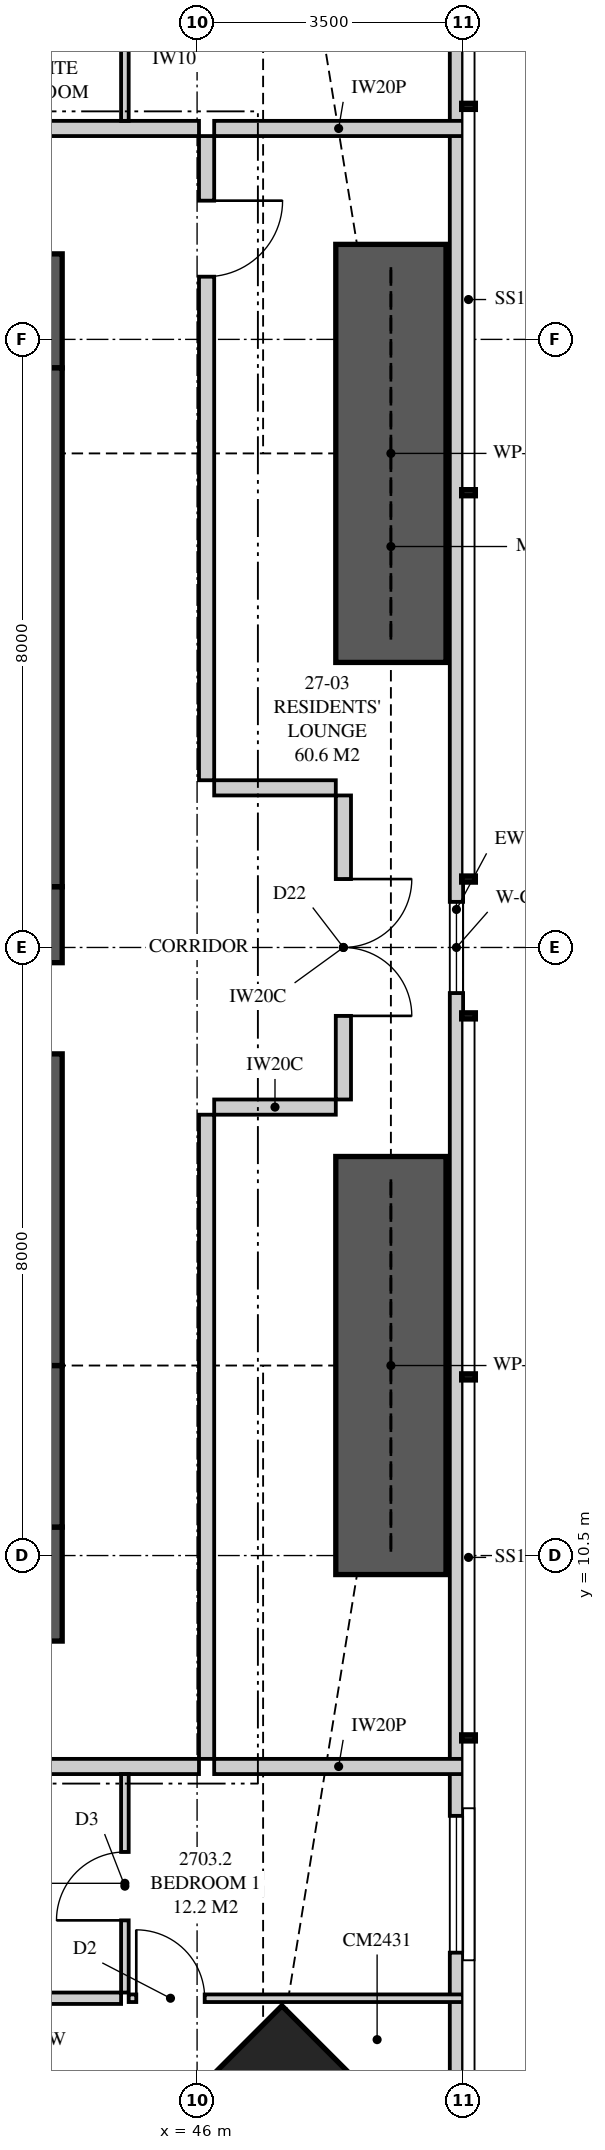
"""IFC4 building model, lengths in metres.
Left out: names, types, materials, properties, quantities, classifications, styles, units other than length and angle.
Written with IfcOpenShell. Run it as: python <this file> out.ifc"""

import sys

from ifc_helpers import new_model, si_unit, direction, frame, frame_2d, origin, origin_2d, place, context, subcontext, project, spatial, polyline, rectangle, outline, extrude, element, fill, save


model = new_model("IFC4")
c1 = context("Model", 3, precision=1e-05, world=origin(), true_north=direction((0.0, 1.0)))
c2 = subcontext(c1, "Body", "Model", "MODEL_VIEW")
j1 = project(units=[si_unit("LENGTHUNIT", "METRE"), si_unit("PLANEANGLEUNIT", "RADIAN")], contexts=[c1])
p1 = place(None, origin())
s1 = spatial("IfcSite", under=j1, at=p1, CompositionType="ELEMENT")
p2 = place(p1, origin())
s2 = spatial("IfcBuilding", under=s1, at=p2, CompositionType="ELEMENT")
p3 = place(p2, frame((0.0, 0.0, 101.5)))
s3 = spatial("IfcBuildingStorey", under=s2, at=p3, CompositionType="ELEMENT", Elevation=101.5)
p4 = place(p3, frame((46.869, 2.631, 0.0), z_axis=(0.0, 0.0, 1.0), x_axis=(-0.707106781187, 0.707106781187, 0.0)))
e1 = element("IfcColumn", 1, at=p4, inside=s3, PredefinedType="COLUMN", context=c2, shape_type="SweptSolid", body=[
    extrude(rectangle(XDim=2.4, YDim=3.1, at=origin_2d()), origin(), (0.0, 0.0, 1.0), 3.35),
])
p5 = place(p3, frame((35.9, 10.125, 0.0), z_axis=(0.0, 0.0, 1.0), x_axis=(1.0, 0.0, 0.0)))
e2 = element("IfcWall", 2, at=p5, inside=s3, PredefinedType="SHEAR", context=c2, shape_type="SweptSolid", body=[
    extrude(rectangle(XDim=8.325, YDim=1.5, at=frame_2d((4.163, 0.0))), origin(), (0.0, 0.0, 1.0), 3.35),
])
p6 = place(p5, frame((2.7, 0.0, 0.0)))
e3 = element("IfcOpeningElement", 3, at=p6, cuts=e2, PredefinedType="OPENING", context=c2, shape_type="SweptSolid", body=[
    extrude(rectangle(XDim=1.0, YDim=2.1, at=frame_2d((0.5, 1.05))), frame((0.0, 0.76, 0.0), z_axis=(0.0, -1.0, 0.0), x_axis=(1.0, 0.0, 0.0)), (0.0, 0.0, 1.0), 1.52),
])
p7 = place(p3, frame((44.225, 26.875, 0.0), z_axis=(0.0, 0.0, 1.0), x_axis=(-1.0, 0.0, 0.0)))
e4 = element("IfcWall", 4, at=p7, inside=s3, PredefinedType="SHEAR", context=c2, shape_type="SweptSolid", body=[
    extrude(rectangle(XDim=8.325, YDim=1.5, at=frame_2d((4.163, 0.0))), origin(), (0.0, 0.0, 1.0), 3.35),
])
p8 = place(p7, frame((5.725, 0.0, 0.0)))
e5 = element("IfcOpeningElement", 5, at=p8, cuts=e4, PredefinedType="OPENING", context=c2, shape_type="SweptSolid", body=[
    extrude(rectangle(XDim=0.9, YDim=2.1, at=frame_2d((0.45, 1.05))), frame((0.0, 0.76, 0.0), z_axis=(0.0, -1.0, 0.0), x_axis=(1.0, 0.0, 0.0)), (0.0, 0.0, 1.0), 1.52),
])
p9 = place(p3, frame((43.8, 10.875, 0.0), z_axis=(0.0, 0.0, 1.0), x_axis=(0.0, 1.0, 0.0)))
e6 = element("IfcWall", 6, at=p9, inside=s3, PredefinedType="SHEAR", context=c2, shape_type="SweptSolid", body=[
    extrude(rectangle(XDim=2.125, YDim=0.85, at=frame_2d((1.062, 0.0))), origin(), (0.0, 0.0, 1.0), 3.35),
])
p10 = place(p3, frame((43.8, 13.0, 0.0), z_axis=(0.0, 0.0, 1.0), x_axis=(0.0, 1.0, 0.0)))
e7 = element("IfcWall", 7, at=p10, inside=s3, PredefinedType="SHEAR", context=c2, shape_type="SweptSolid", body=[
    extrude(rectangle(XDim=6.3, YDim=0.85, at=frame_2d((3.15, 0.0))), origin(), (0.0, 0.0, 1.0), 3.35),
])
p11 = place(p10, frame((4.1, 0.0, 0.0)))
e8 = element("IfcOpeningElement", 8, at=p11, cuts=e7, PredefinedType="OPENING", context=c2, shape_type="SweptSolid", body=[
    extrude(rectangle(XDim=1.2, YDim=2.2, at=frame_2d((0.6, 1.1))), frame((0.0, 0.435, 0.0), z_axis=(0.0, -1.0, 0.0), x_axis=(1.0, 0.0, 0.0)), (0.0, 0.0, 1.0), 0.87),
])
p12 = place(p3, frame((43.8, 19.3, 0.0), z_axis=(0.0, 0.0, 1.0), x_axis=(0.0, 1.0, 0.0)))
e9 = element("IfcWall", 9, at=p12, inside=s3, PredefinedType="SHEAR", context=c2, shape_type="SweptSolid", body=[
    extrude(rectangle(XDim=6.825, YDim=0.85, at=frame_2d((3.413, 0.0))), origin(), (0.0, 0.0, 1.0), 3.35),
])
p13 = place(p3, frame((49.413, 3.051, 0.0), z_axis=(0.0, 0.0, 1.0), x_axis=(0.0, 1.0, 0.0)))
e10 = element("IfcWall", 10, at=p13, inside=s3, PredefinedType="SOLIDWALL", context=c2, shape_type="SweptSolid", body=[
    extrude(outline(polyline([(0.0, 0.0), (31.897, 0.0), (31.897, 3.11), (22.167, 3.11), (22.167, 2.15), (22.074, 2.15), (22.074, 3.11), (21.949, 3.11), (21.949, 2.15), (9.949, 2.15), (9.949, 3.11), (9.823, 3.11), (9.823, 2.15), (9.73, 2.15), (9.73, 3.11), (0.0, 3.11), (0.0, 0.0)])), frame((0.0, 0.087, 0.0), z_axis=(0.0, -1.0, 0.0), x_axis=(1.0, 0.0, 0.0)), (0.0, 0.0, 1.0), 0.175),
])
p14 = place(p13, frame((2.224, 0.0, 0.4)))
e11 = element("IfcOpeningElement", 11, at=p14, cuts=e10, PredefinedType="OPENING", context=c2, shape_type="SweptSolid", body=[
    extrude(rectangle(XDim=1.8, YDim=1.7, at=frame_2d((0.9, 0.85))), frame((0.0, 0.097, 0.0), z_axis=(0.0, -1.0, 0.0), x_axis=(1.0, 0.0, 0.0)), (0.0, 0.0, 1.0), 0.195),
])
p15 = place(p13, frame((14.849, 0.0, 0.4)))
e12 = element("IfcOpeningElement", 12, at=p15, cuts=e10, PredefinedType="OPENING", context=c2, shape_type="SweptSolid", body=[
    extrude(rectangle(XDim=1.2, YDim=1.7, at=frame_2d((0.6, 0.85))), frame((0.0, 0.097, 0.0), z_axis=(0.0, -1.0, 0.0), x_axis=(1.0, 0.0, 0.0)), (0.0, 0.0, 1.0), 0.195),
])
p16 = place(p13, frame((27.373, 0.0, 0.4)))
e13 = element("IfcOpeningElement", 13, at=p16, cuts=e10, PredefinedType="OPENING", context=c2, shape_type="SweptSolid", body=[
    extrude(rectangle(XDim=1.8, YDim=1.7, at=frame_2d((0.9, 0.85))), frame((0.0, 0.097, 0.0), z_axis=(0.0, -1.0, 0.0), x_axis=(1.0, 0.0, 0.0)), (0.0, 0.0, 1.0), 0.195),
])
p17 = place(p3, frame((36.55, 7.725, 0.0), z_axis=(0.0, 0.0, 1.0), x_axis=(1.0, 0.0, 0.0)))
e14 = element("IfcWall", 14, at=p17, inside=s3, PredefinedType="PARTITIONING", context=c2, shape_type="SweptSolid", body=[
    extrude(outline(polyline([(0.0, 0.0), (9.475, 0.0), (9.475, 3.11), (2.412, 3.11), (2.412, 2.541), (1.738, 2.541), (1.738, 3.11), (0.0, 3.11), (0.0, 0.0)])), frame((0.0, 0.1, 0.0), z_axis=(0.0, -1.0, 0.0), x_axis=(1.0, 0.0, 0.0)), (0.0, 0.0, 1.0), 0.2),
])
p18 = place(p17, frame((2.4, 0.0, 0.0)))
e15 = element("IfcOpeningElement", 15, at=p18, cuts=e14, PredefinedType="OPENING", context=c2, shape_type="SweptSolid", body=[
    extrude(rectangle(XDim=1.05, YDim=2.2, at=frame_2d((0.525, 1.1))), frame((0.0, 0.11, 0.0), z_axis=(0.0, -1.0, 0.0), x_axis=(1.0, 0.0, 0.0)), (0.0, 0.0, 1.0), 0.22),
])
p19 = place(p3, frame((45.05, 4.751, 0.0), z_axis=(0.0, 0.0, 1.0), x_axis=(0.0, 1.0, 0.0)))
e16 = element("IfcWall", 16, at=p19, inside=s3, PredefinedType="PARTITIONING", context=c2, shape_type="SweptSolid", body=[
    extrude(rectangle(XDim=2.874, YDim=0.1, at=frame_2d((1.437, 0.0))), origin(), (0.0, 0.0, 1.0), 3.11),
])
p20 = place(p19, frame((0.949, 0.0, 0.0)))
e17 = element("IfcOpeningElement", 17, at=p20, cuts=e16, PredefinedType="OPENING", context=c2, shape_type="SweptSolid", body=[
    extrude(rectangle(XDim=0.9, YDim=2.1, at=frame_2d((0.45, 1.05))), frame((0.0, 0.06, 0.0), z_axis=(0.0, -1.0, 0.0), x_axis=(1.0, 0.0, 0.0)), (0.0, 0.0, 1.0), 0.12),
])
p21 = place(p3, frame((45.1, 4.676, 0.0), z_axis=(0.0, 0.0, 1.0), x_axis=(1.0, 0.0, 0.0)))
e18 = element("IfcWall", 18, at=p21, inside=s3, PredefinedType="PARTITIONING", context=c2, shape_type="SweptSolid", body=[
    extrude(outline(polyline([(0.0, 0.0), (4.4, 0.0), (4.4, 3.11), (2.971, 3.11), (2.971, 2.15), (1.229, 2.15), (1.229, 3.11), (0.0, 3.11), (0.0, 0.0)])), frame((0.0, 0.05, 0.0), z_axis=(0.0, -1.0, 0.0), x_axis=(1.0, 0.0, 0.0)), (0.0, 0.0, 1.0), 0.1),
])
p22 = place(p21, frame((0.1, 0.0, 0.0)))
e19 = element("IfcOpeningElement", 19, at=p22, cuts=e18, PredefinedType="OPENING", context=c2, shape_type="SweptSolid", body=[
    extrude(rectangle(XDim=0.9, YDim=2.1, at=frame_2d((0.45, 1.05))), frame((0.0, 0.06, 0.0), z_axis=(0.0, -1.0, 0.0), x_axis=(1.0, 0.0, 0.0)), (0.0, 0.0, 1.0), 0.12),
])
p23 = place(p3, frame((42.725, 4.676, 0.0), z_axis=(0.0, 0.0, 1.0), x_axis=(1.0, 0.0, 0.0)))
e20 = element("IfcWall", 20, at=p23, inside=s3, PredefinedType="PLUMBINGWALL", context=c2, shape_type="SweptSolid", body=[
    extrude(rectangle(XDim=2.275, YDim=0.15, at=frame_2d((1.137, 0.0))), origin(), (0.0, 0.0, 1.0), 3.11),
])
p24 = place(p3, frame((46.225, 7.725, 0.0), z_axis=(0.0, 0.0, 1.0), x_axis=(1.0, 0.0, 0.0)))
e21 = element("IfcWall", 21, at=p24, inside=s3, PredefinedType="PARTITIONING", context=c2, shape_type="SweptSolid", body=[
    extrude(outline(polyline([(0.0, 0.0), (3.275, 0.0), (3.275, 3.11), (2.392, 3.11), (2.392, 2.15), (0.643, 2.15), (0.643, 2.541), (0.306, 2.541), (0.306, 3.11), (0.0, 3.11), (0.0, 0.0)])), frame((0.0, 0.1, 0.0), z_axis=(0.0, -1.0, 0.0), x_axis=(1.0, 0.0, 0.0)), (0.0, 0.0, 1.0), 0.2),
])
p25 = place(p3, frame((36.9, 29.275, 0.0), z_axis=(0.0, 0.0, 1.0), x_axis=(1.0, 0.0, 0.0)))
e22 = element("IfcWall", 22, at=p25, inside=s3, PredefinedType="PARTITIONING", context=c2, shape_type="SweptSolid", body=[
    extrude(outline(polyline([(0.0, 0.0), (9.125, 0.0), (9.125, 3.11), (2.062, 3.11), (2.062, 2.541), (1.388, 2.541), (1.388, 3.11), (0.0, 3.11), (0.0, 0.0)])), frame((0.0, 0.1, 0.0), z_axis=(0.0, -1.0, 0.0), x_axis=(1.0, 0.0, 0.0)), (0.0, 0.0, 1.0), 0.2),
])
p26 = place(p25, frame((4.5, 0.0, 0.0)))
e23 = element("IfcOpeningElement", 23, at=p26, cuts=e22, PredefinedType="OPENING", context=c2, shape_type="SweptSolid", body=[
    extrude(rectangle(XDim=1.05, YDim=2.2, at=frame_2d((0.525, 1.1))), frame((0.0, 0.11, 0.0), z_axis=(0.0, -1.0, 0.0), x_axis=(1.0, 0.0, 0.0)), (0.0, 0.0, 1.0), 0.22),
])
p27 = place(p3, frame((45.05, 33.249, 0.0), z_axis=(0.0, 0.0, 1.0), x_axis=(0.0, -1.0, 0.0)))
e24 = element("IfcWall", 24, at=p27, inside=s3, PredefinedType="PARTITIONING", context=c2, shape_type="SweptSolid", body=[
    extrude(rectangle(XDim=3.874, YDim=0.1, at=frame_2d((1.937, 0.0))), origin(), (0.0, 0.0, 1.0), 3.11),
])
p28 = place(p27, frame((1.45, 0.0, 0.0)))
e25 = element("IfcOpeningElement", 25, at=p28, cuts=e24, PredefinedType="OPENING", context=c2, shape_type="SweptSolid", body=[
    extrude(rectangle(XDim=0.9, YDim=2.1, at=frame_2d((0.45, 1.05))), frame((0.0, 0.06, 0.0), z_axis=(0.0, -1.0, 0.0), x_axis=(1.0, 0.0, 0.0)), (0.0, 0.0, 1.0), 0.12),
])
p29 = place(p3, frame((46.225, 29.275, 0.0), z_axis=(0.0, 0.0, 1.0), x_axis=(1.0, 0.0, 0.0)))
e26 = element("IfcWall", 26, at=p29, inside=s3, PredefinedType="PARTITIONING", context=c2, shape_type="SweptSolid", body=[
    extrude(outline(polyline([(0.0, 0.0), (3.275, 0.0), (3.275, 3.11), (2.554, 3.11), (2.554, 2.15), (0.805, 2.15), (0.805, 2.541), (0.306, 2.541), (0.306, 3.11), (0.0, 3.11), (0.0, 0.0)])), frame((0.0, 0.1, 0.0), z_axis=(0.0, -1.0, 0.0), x_axis=(1.0, 0.0, 0.0)), (0.0, 0.0, 1.0), 0.2),
])
p30 = place(p3, frame((46.125, 7.825, 0.0), z_axis=(0.0, 0.0, 1.0), x_axis=(0.0, 1.0, 0.0)))
e27 = element("IfcWall", 27, at=p30, inside=s3, PredefinedType="PARTITIONING", context=c2, shape_type="SweptSolid", body=[
    extrude(outline(polyline([(0.0, 0.0), (8.475, 0.0), (8.475, 3.11), (5.512, 3.11), (5.512, 2.541), (4.838, 2.541), (4.838, 3.11), (0.0, 3.11), (0.0, 0.0)])), frame((0.0, 0.1, 0.0), z_axis=(0.0, -1.0, 0.0), x_axis=(1.0, 0.0, 0.0)), (0.0, 0.0, 1.0), 0.2),
])
p31 = place(p3, frame((46.125, 20.7, 0.0), z_axis=(0.0, 0.0, 1.0), x_axis=(0.0, 1.0, 0.0)))
e28 = element("IfcWall", 28, at=p31, inside=s3, PredefinedType="PARTITIONING", context=c2, shape_type="SweptSolid", body=[
    extrude(outline(polyline([(0.0, 0.0), (8.475, 0.0), (8.475, 3.11), (4.637, 3.11), (4.637, 2.541), (3.963, 2.541), (3.963, 3.11), (0.0, 3.11), (0.0, 0.0)])), frame((0.0, 0.1, 0.0), z_axis=(0.0, -1.0, 0.0), x_axis=(1.0, 0.0, 0.0)), (0.0, 0.0, 1.0), 0.2),
])
p32 = place(p31, frame((6.625, 0.0, 0.0)))
e29 = element("IfcOpeningElement", 29, at=p32, cuts=e28, PredefinedType="OPENING", context=c2, shape_type="SweptSolid", body=[
    extrude(rectangle(XDim=1.0, YDim=2.1, at=frame_2d((0.5, 1.05))), frame((0.0, 0.11, 0.0), z_axis=(0.0, -1.0, 0.0), x_axis=(1.0, 0.0, 0.0)), (0.0, 0.0, 1.0), 0.22),
])
p33 = place(p3, frame((47.925, 16.5, 0.0), z_axis=(0.0, 0.0, 1.0), x_axis=(0.0, 1.0, 0.0)))
e30 = element("IfcWall", 30, at=p33, inside=s3, PredefinedType="PARTITIONING", context=c2, shape_type="SweptSolid", body=[
    extrude(outline(polyline([(0.0, 0.0), (4.0, 0.0), (4.0, 3.11), (4.0, 2.15), (0.0, 2.15), (0.0, 3.11), (0.0, 0.0)])), frame((0.0, 0.1, 0.0), z_axis=(0.0, -1.0, 0.0), x_axis=(1.0, 0.0, 0.0)), (0.0, 0.0, 1.0), 0.2),
])
p34 = place(p33, frame((1.1, 0.0, 0.0)))
e31 = element("IfcOpeningElement", 31, at=p34, cuts=e30, PredefinedType="OPENING", context=c2, shape_type="SweptSolid", body=[
    extrude(rectangle(XDim=1.8, YDim=2.1, at=frame_2d((0.9, 1.05))), frame((0.0, 0.11, 0.0), z_axis=(0.0, -1.0, 0.0), x_axis=(1.0, 0.0, 0.0)), (0.0, 0.0, 1.0), 0.22),
])
for number, where, z_axis, x_axis in (
    (32, (46.225, 16.4, 0.0), (0.0, 0.0, 1.0), (1.0, 0.0, 0.0)),
    (33, (46.225, 20.6, 0.0), (0.0, 0.0, 1.0), (1.0, 0.0, 0.0)),
):
    element("IfcWall", number, at=place(p3, frame(where, z_axis=z_axis, x_axis=x_axis)), inside=s3, PredefinedType="PARTITIONING", context=c2, shape_type="SweptSolid", body=[
        extrude(outline(polyline([(0.0, 0.0), (1.6, 0.0), (1.6, 3.11), (1.6, 2.15), (1.415, 2.15), (1.415, 3.11), (0.0, 3.11), (0.0, 0.0)])), frame((0.0, 0.1, 0.0), z_axis=(0.0, -1.0, 0.0), x_axis=(1.0, 0.0, 0.0)), (0.0, 0.0, 1.0), 0.2),
    ])
for number, where, z_axis, x_axis in (
    (34, (48.55, 10.25, 0.0), (0.0, 0.0, 1.0), (0.0, 1.0, 0.0)),
    (35, (48.55, 22.25, 0.0), (0.0, 0.0, 1.0), (0.0, 1.0, 0.0)),
):
    element("IfcWall", number, at=place(p3, frame(where, z_axis=z_axis, x_axis=x_axis)), inside=s3, PredefinedType="SHEAR", context=c2, shape_type="SweptSolid", body=[
        extrude(rectangle(XDim=5.5, YDim=1.45, at=frame_2d((2.75, 0.0))), origin(), (0.0, 0.0, 1.0), 3.35),
    ])
p35 = place(p14, origin())
e36 = element("IfcWindow", 36, at=p35, inside=s3, PartitioningType="SINGLE_PANEL", PredefinedType="WINDOW", context=c2, shape_type="SweptSolid", body=[
    extrude(rectangle(XDim=1.8, YDim=1.7, at=frame_2d((0.9, 0.85))), frame((0.0, 0.03, 0.0), z_axis=(0.0, -1.0, 0.0), x_axis=(1.0, 0.0, 0.0)), (0.0, 0.0, 1.0), 0.06),
])
fill(e11, e36)
p36 = place(p15, origin())
e37 = element("IfcWindow", 37, at=p36, inside=s3, PartitioningType="SINGLE_PANEL", PredefinedType="WINDOW", context=c2, shape_type="SweptSolid", body=[
    extrude(rectangle(XDim=1.2, YDim=1.7, at=frame_2d((0.6, 0.85))), frame((0.0, 0.03, 0.0), z_axis=(0.0, -1.0, 0.0), x_axis=(1.0, 0.0, 0.0)), (0.0, 0.0, 1.0), 0.06),
])
fill(e12, e37)
p37 = place(p22, origin())
e38 = element("IfcDoor", 38, at=p37, inside=s3, OperationType="SINGLE_SWING_LEFT", PredefinedType="DOOR", context=c2, shape_type="SweptSolid", body=[
    extrude(rectangle(XDim=0.9, YDim=2.1, at=frame_2d((0.45, 1.05))), frame((0.0, 0.025, 0.0), z_axis=(0.0, -1.0, 0.0), x_axis=(1.0, 0.0, 0.0)), (0.0, 0.0, 1.0), 0.05),
])
fill(e19, e38)
p38 = place(p20, origin())
e39 = element("IfcDoor", 39, at=p38, inside=s3, OperationType="SINGLE_SWING_LEFT", PredefinedType="DOOR", context=c2, shape_type="SweptSolid", body=[
    extrude(rectangle(XDim=0.9, YDim=2.1, at=frame_2d((0.45, 1.05))), frame((0.0, 0.025, 0.0), z_axis=(0.0, -1.0, 0.0), x_axis=(1.0, 0.0, 0.0)), (0.0, 0.0, 1.0), 0.05),
])
fill(e17, e39)
p39 = place(p34, frame((1.8, 0.0, 0.0), z_axis=(0.0, 0.0, 1.0), x_axis=(-1.0, 0.0, 0.0)))
e40 = element("IfcDoor", 40, at=p39, inside=s3, OperationType="DOUBLE_DOOR_SINGLE_SWING", PredefinedType="DOOR", context=c2, shape_type="SweptSolid", body=[
    extrude(rectangle(XDim=1.8, YDim=2.1, at=frame_2d((0.9, 1.05))), frame((0.0, 0.025, 0.0), z_axis=(0.0, -1.0, 0.0), x_axis=(1.0, 0.0, 0.0)), (0.0, 0.0, 1.0), 0.05),
])
fill(e31, e40)
p40 = place(p32, frame((1.0, 0.0, 0.0), z_axis=(0.0, 0.0, 1.0), x_axis=(-1.0, 0.0, 0.0)))
e41 = element("IfcDoor", 41, at=p40, inside=s3, OperationType="SINGLE_SWING_LEFT", PredefinedType="DOOR", context=c2, shape_type="SweptSolid", body=[
    extrude(rectangle(XDim=1.0, YDim=2.1, at=frame_2d((0.5, 1.05))), frame((0.0, 0.025, 0.0), z_axis=(0.0, -1.0, 0.0), x_axis=(1.0, 0.0, 0.0)), (0.0, 0.0, 1.0), 0.05),
])
fill(e29, e41)
save(model, sys.argv[1])
